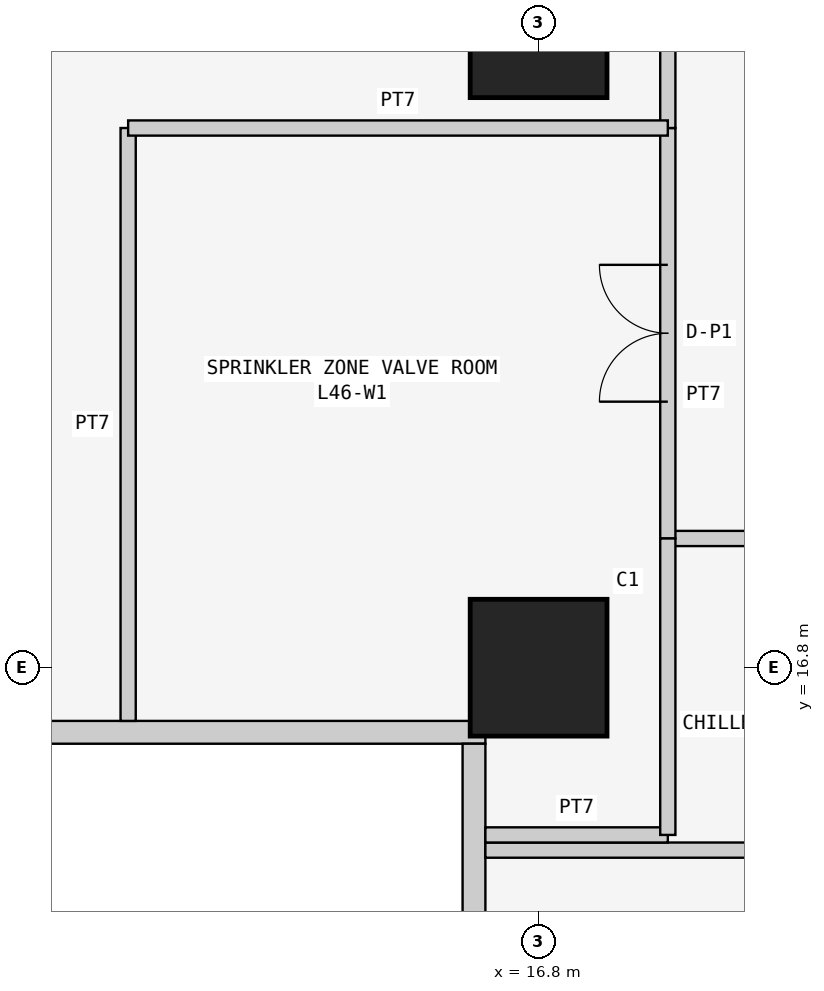
"""IFC4 building model, lengths in metres.
Left out: names, types, materials, properties, quantities, classifications, styles, units other than length and angle.
Written with IfcOpenShell. Run it as: python <this file> out.ifc"""

import sys

from ifc_helpers import new_model, si_unit, direction, frame, frame_2d, origin, origin_2d, place, context, subcontext, project, spatial, rectangle, extrude, element, fill, save


model = new_model("IFC4")
c1 = context("Model", 3, precision=1e-05, world=origin(), true_north=direction((0.0, 1.0)))
c2 = subcontext(c1, "Body", "Model", "MODEL_VIEW")
j1 = project(units=[si_unit("LENGTHUNIT", "METRE"), si_unit("PLANEANGLEUNIT", "RADIAN")], contexts=[c1])
p1 = place(None, origin())
s1 = spatial("IfcSite", under=j1, at=p1, CompositionType="ELEMENT")
p2 = place(p1, origin())
s2 = spatial("IfcBuilding", under=s1, at=p2, CompositionType="ELEMENT")
p3 = place(p2, frame((0.0, 0.0, 177.3)))
s3 = spatial("IfcBuildingStorey", under=s2, at=p3, CompositionType="ELEMENT", Elevation=177.3)
for number, where, z_axis, x_axis in (
    (1, (16.8, 16.8, 0.0), (0.0, 0.0, 1.0), (1.0, 0.0, 0.0)),
    (2, (16.8, 25.2, 0.0), (0.0, 0.0, 1.0), (1.0, 0.0, 0.0)),
):
    element("IfcColumn", number, at=place(p3, frame(where, z_axis=z_axis, x_axis=x_axis)), inside=s3, PredefinedType="COLUMN", context=c2, shape_type="SweptSolid", body=[
        extrude(rectangle(XDim=1.8, YDim=1.8, at=origin_2d()), origin(), (0.0, 0.0, 1.0), 6.0),
    ])
p4 = place(p3, frame((0.4, 15.95, 0.0), z_axis=(0.0, 0.0, 1.0), x_axis=(1.0, 0.0, 0.0)))
e3 = element("IfcWall", 3, at=p4, inside=s3, PredefinedType="SOLIDWALL", context=c2, shape_type="SweptSolid", body=[
    extrude(rectangle(XDim=15.7, YDim=0.3, at=frame_2d((7.85, 0.0))), origin(), (0.0, 0.0, 1.0), 5.85),
])
p5 = place(p3, frame((15.95, 15.8, 0.0), z_axis=(0.0, 0.0, 1.0), x_axis=(0.0, -1.0, 0.0)))
e4 = element("IfcWall", 4, at=p5, inside=s3, PredefinedType="SOLIDWALL", context=c2, shape_type="SweptSolid", body=[
    extrude(rectangle(XDim=7.0, YDim=0.3, at=frame_2d((3.5, 0.0))), origin(), (0.0, 0.0, 1.0), 5.85),
])
p6 = place(p3, frame((23.9, 18.5, 0.0), z_axis=(0.0, 0.0, 1.0), x_axis=(-1.0, 0.0, 0.0)))
e5 = element("IfcWall", 5, at=p6, inside=s3, PredefinedType="PARTITIONING", context=c2, shape_type="SweptSolid", body=[
    extrude(rectangle(XDim=5.4, YDim=0.2, at=frame_2d((2.7, 0.0))), origin(), (0.0, 0.0, 1.0), 5.85),
])
p7 = place(p6, frame((1.8, 0.0, 0.0)))
e6 = element("IfcOpeningElement", 6, at=p7, cuts=e5, PredefinedType="OPENING", context=c2, shape_type="SweptSolid", body=[
    extrude(rectangle(XDim=1.8, YDim=2.4, at=frame_2d((0.9, 1.2))), frame((0.0, 0.11, 0.0), z_axis=(0.0, -1.0, 0.0), x_axis=(1.0, 0.0, 0.0)), (0.0, 0.0, 1.0), 0.22),
])
p8 = place(p3, frame((18.5, 18.5, 0.0), z_axis=(0.0, 0.0, 1.0), x_axis=(0.0, 1.0, 0.0)))
e7 = element("IfcWall", 7, at=p8, inside=s3, PredefinedType="PARTITIONING", context=c2, shape_type="SweptSolid", body=[
    extrude(rectangle(XDim=5.4, YDim=0.2, at=frame_2d((2.7, 0.0))), origin(), (0.0, 0.0, 1.0), 5.85),
])
p9 = place(p8, frame((1.8, 0.0, 0.0)))
e8 = element("IfcOpeningElement", 8, at=p9, cuts=e7, PredefinedType="OPENING", context=c2, shape_type="SweptSolid", body=[
    extrude(rectangle(XDim=1.8, YDim=2.4, at=frame_2d((0.9, 1.2))), frame((0.0, 0.11, 0.0), z_axis=(0.0, -1.0, 0.0), x_axis=(1.0, 0.0, 0.0)), (0.0, 0.0, 1.0), 0.22),
])
p10 = place(p3, frame((18.5, 23.9, 0.0), z_axis=(0.0, 0.0, 1.0), x_axis=(0.0, 1.0, 0.0)))
e9 = element("IfcWall", 9, at=p10, inside=s3, PredefinedType="PARTITIONING", context=c2, shape_type="SweptSolid", body=[
    extrude(rectangle(XDim=2.7, YDim=0.2, at=frame_2d((1.35, 0.0))), origin(), (0.0, 0.0, 1.0), 5.85),
])
p11 = place(p3, frame((23.9, 14.4, 0.0), z_axis=(0.0, 0.0, 1.0), x_axis=(-1.0, 0.0, 0.0)))
e10 = element("IfcWall", 10, at=p11, inside=s3, PredefinedType="PARTITIONING", context=c2, shape_type="SweptSolid", body=[
    extrude(rectangle(XDim=7.8, YDim=0.2, at=frame_2d((3.9, 0.0))), origin(), (0.0, 0.0, 1.0), 5.85),
])
p12 = place(p3, frame((16.1, 14.6, 0.0), z_axis=(0.0, 0.0, 1.0), x_axis=(1.0, 0.0, 0.0)))
e11 = element("IfcWall", 11, at=p12, inside=s3, PredefinedType="PARTITIONING", context=c2, shape_type="SweptSolid", body=[
    extrude(rectangle(XDim=2.4, YDim=0.2, at=frame_2d((1.2, 0.0))), origin(), (0.0, 0.0, 1.0), 5.85),
])
p13 = place(p3, frame((18.5, 14.6, 0.0), z_axis=(0.0, 0.0, 1.0), x_axis=(0.0, 1.0, 0.0)))
e12 = element("IfcWall", 12, at=p13, inside=s3, PredefinedType="PARTITIONING", context=c2, shape_type="SweptSolid", body=[
    extrude(rectangle(XDim=3.9, YDim=0.2, at=frame_2d((1.95, 0.0))), origin(), (0.0, 0.0, 1.0), 5.85),
])
p14 = place(p3, frame((11.4, 16.1, 0.0), z_axis=(0.0, 0.0, 1.0), x_axis=(0.0, 1.0, 0.0)))
e13 = element("IfcWall", 13, at=p14, inside=s3, PredefinedType="PARTITIONING", context=c2, shape_type="SweptSolid", body=[
    extrude(rectangle(XDim=7.8, YDim=0.2, at=frame_2d((3.9, 0.0))), origin(), (0.0, 0.0, 1.0), 5.85),
])
p15 = place(p3, frame((11.4, 23.9, 0.0), z_axis=(0.0, 0.0, 1.0), x_axis=(1.0, 0.0, 0.0)))
e14 = element("IfcWall", 14, at=p15, inside=s3, PredefinedType="PARTITIONING", context=c2, shape_type="SweptSolid", body=[
    extrude(rectangle(XDim=7.1, YDim=0.2, at=frame_2d((3.55, 0.0))), origin(), (0.0, 0.0, 1.0), 5.85),
])
p16 = place(p9, origin())
e15 = element("IfcDoor", 15, at=p16, inside=s3, OperationType="DOUBLE_DOOR_SINGLE_SWING", PredefinedType="DOOR", context=c2, shape_type="SweptSolid", body=[
    extrude(rectangle(XDim=1.8, YDim=2.4, at=frame_2d((0.9, 1.2))), frame((0.0, 0.025, 0.0), z_axis=(0.0, -1.0, 0.0), x_axis=(1.0, 0.0, 0.0)), (0.0, 0.0, 1.0), 0.05),
])
fill(e8, e15)
save(model, sys.argv[1])
